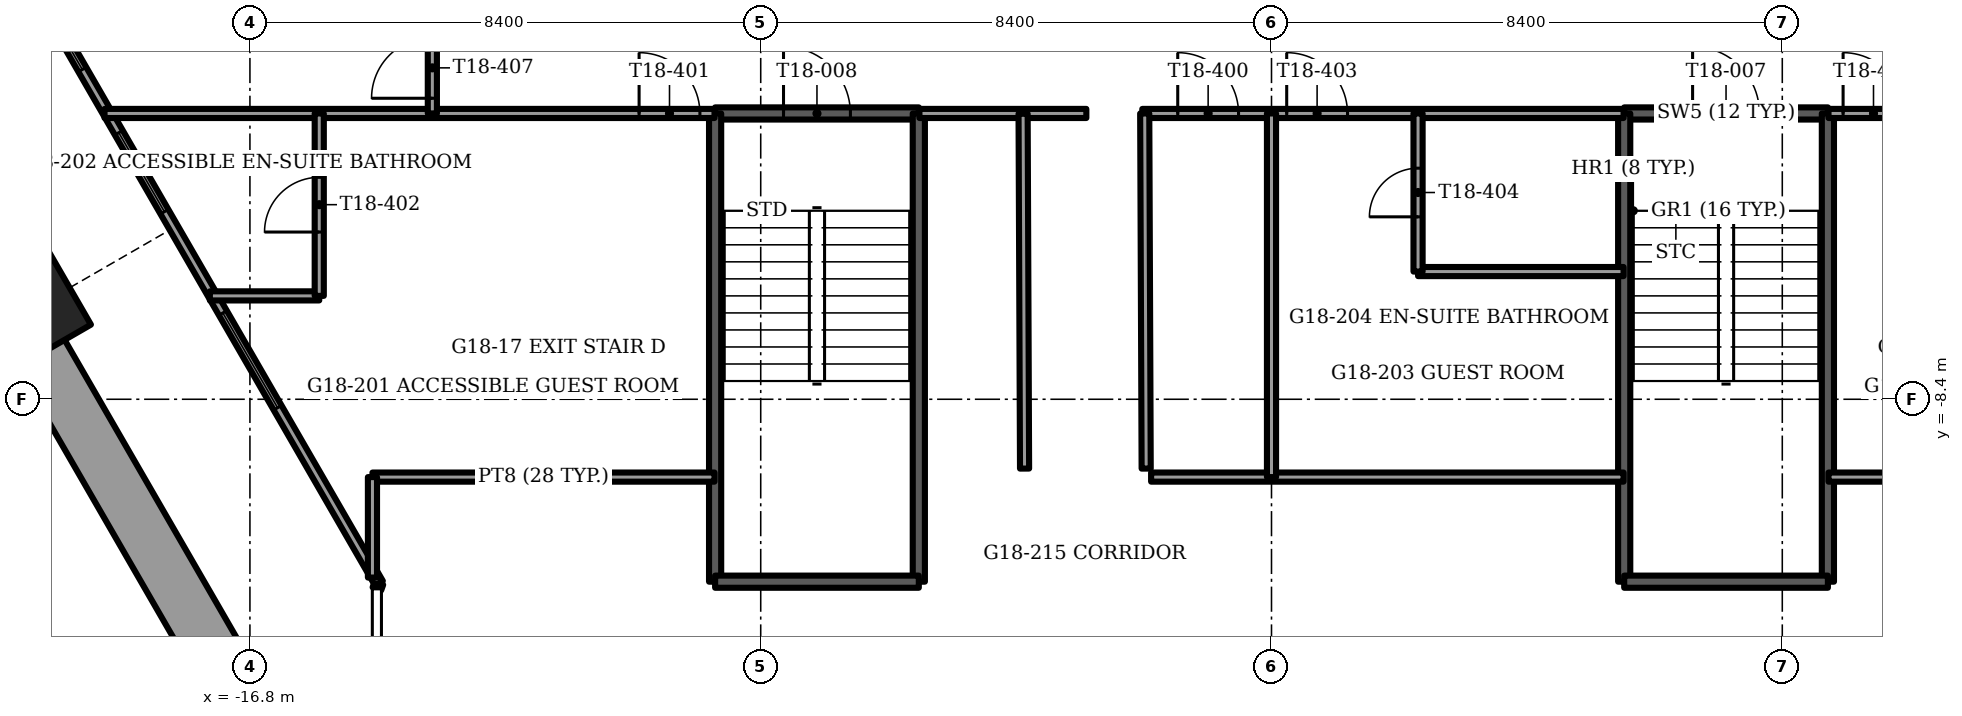
"""IFC4 building model, lengths in metres.
Left out: names, types, materials, properties, quantities, classifications, styles, units other than length and angle.
Written with IfcOpenShell. Run it as: python <this file> out.ifc"""

import sys

from ifc_helpers import new_model, si_unit, direction, frame, frame_2d, origin, origin_2d, place, context, subcontext, project, spatial, rectangle, extrude, element, fill, save


model = new_model("IFC4")
c1 = context("Model", 3, precision=1e-05, world=origin(), true_north=direction((0.0, 1.0)))
c2 = subcontext(c1, "Body", "Model", "MODEL_VIEW")
j1 = project(units=[si_unit("LENGTHUNIT", "METRE"), si_unit("PLANEANGLEUNIT", "RADIAN")], contexts=[c1])
p1 = place(None, origin())
s1 = spatial("IfcSite", under=j1, at=p1, CompositionType="ELEMENT")
p2 = place(p1, origin())
s2 = spatial("IfcBuilding", under=s1, at=p2, CompositionType="ELEMENT")
p3 = place(p2, frame((0.0, 0.0, 73.0)))
s3 = spatial("IfcBuildingStorey", under=s2, at=p3, CompositionType="ELEMENT", Elevation=73.0)
p4 = place(p3, frame((-20.371, -6.917, -1.2), z_axis=(0.0, 0.0, 1.0), x_axis=(-0.5, 0.866025403784, 0.0)))
e1 = element("IfcColumn", 1, at=p4, inside=s3, PredefinedType="COLUMN", context=c2, shape_type="SweptSolid", body=[
    extrude(rectangle(XDim=1.4, YDim=1.4, at=origin_2d()), origin(), (0.0, 0.0, 1.0), 3.75),
])
p5 = place(p3, frame((-20.252, -7.622, 0.0), z_axis=(0.0, 0.0, 1.0), x_axis=(0.499997206141, -0.866027016814, 0.0)))
e2 = element("IfcWall", 2, at=p5, inside=s3, PredefinedType="PARAPET", context=c2, shape_type="SweptSolid", body=[
    extrude(rectangle(XDim=7.051, YDim=0.9, at=frame_2d((3.525, 0.0))), origin(), (0.0, 0.0, 1.0), 1.1),
])
p6 = place(p3, frame((-20.401, -1.514, 0.0), z_axis=(0.0, 0.0, 1.0), x_axis=(0.499991453095, -0.866030338286, 0.0)))
e3 = element("IfcWall", 3, at=p6, inside=s3, PredefinedType="SOLIDWALL", context=c2, shape_type="SweptSolid", body=[
    extrude(rectangle(XDim=11.444, YDim=0.15, at=frame_2d((5.722, 0.0))), origin(), (0.0, 0.0, 1.0), 3.45),
])
p7 = place(p6, frame((0.789, 0.0, 0.15)))
e4 = element("IfcOpeningElement", 4, at=p7, cuts=e3, PredefinedType="OPENING", context=c2, shape_type="SweptSolid", body=[
    extrude(rectangle(XDim=0.9, YDim=2.2, at=frame_2d((0.45, 1.1))), frame((0.0, 0.075, 0.0), z_axis=(0.0, -1.0, 0.0), x_axis=(1.0, 0.0, 0.0)), (0.0, 0.0, 1.0), 0.15),
])
p8 = place(p6, frame((2.889, 0.0, 0.15)))
e5 = element("IfcOpeningElement", 5, at=p8, cuts=e3, PredefinedType="OPENING", context=c2, shape_type="SweptSolid", body=[
    extrude(rectangle(XDim=1.5, YDim=2.2, at=frame_2d((0.75, 1.1))), frame((0.0, 0.075, 0.0), z_axis=(0.0, -1.0, 0.0), x_axis=(1.0, 0.0, 0.0)), (0.0, 0.0, 1.0), 0.15),
])
p9 = place(p6, frame((6.312, 0.0, 0.15)))
e6 = element("IfcOpeningElement", 6, at=p9, cuts=e3, PredefinedType="OPENING", context=c2, shape_type="SweptSolid", body=[
    extrude(rectangle(XDim=1.8, YDim=2.2, at=frame_2d((0.9, 1.1))), frame((0.0, 0.075, 0.0), z_axis=(0.0, -1.0, 0.0), x_axis=(1.0, 0.0, 0.0)), (0.0, 0.0, 1.0), 0.15),
])
p10 = place(p3, frame((-14.679, -11.425, 0.0), z_axis=(0.0, 0.0, 1.0), x_axis=(-0.338543167143, -0.940950861619, 0.0)))
e7 = element("IfcWall", 7, at=p10, inside=s3, PredefinedType="SOLIDWALL", context=c2, shape_type="SweptSolid", body=[
    extrude(rectangle(XDim=0.098, YDim=0.15, at=frame_2d((0.049, 0.0))), origin(), (0.0, 0.0, 1.0), 3.45),
])
p11 = place(p3, frame((5.8, -3.7, -0.3), z_axis=(0.0, 0.0, 1.0), x_axis=(1.0, 0.0, 0.0)))
e8 = element("IfcWall", 8, at=p11, inside=s3, PredefinedType="SOLIDWALL", context=c2, shape_type="SweptSolid", body=[
    extrude(rectangle(XDim=3.35, YDim=0.2, at=frame_2d((1.675, 0.0))), origin(), (0.0, 0.0, 1.0), 3.75),
])
p12 = place(p11, frame((1.125, 0.0, 0.0)))
e9 = element("IfcOpeningElement", 9, at=p12, cuts=e8, PredefinedType="OPENING", context=c2, shape_type="SweptSolid", body=[
    extrude(rectangle(XDim=1.1, YDim=2.1, at=frame_2d((0.55, 1.05))), frame((0.0, 0.1, 0.0), z_axis=(0.0, -1.0, 0.0), x_axis=(1.0, 0.0, 0.0)), (0.0, 0.0, 1.0), 0.2),
])
for number, where, z_axis, x_axis in (
    (10, (5.8, -3.7, -0.3), (0.0, 0.0, 1.0), (0.0, -1.0, 0.0)),
    (11, (9.15, -3.7, -0.3), (0.0, 0.0, 1.0), (0.0, -1.0, 0.0)),
):
    element("IfcWall", number, at=place(p3, frame(where, z_axis=z_axis, x_axis=x_axis)), inside=s3, PredefinedType="SOLIDWALL", context=c2, shape_type="SweptSolid", body=[
        extrude(rectangle(XDim=7.7, YDim=0.2, at=frame_2d((3.85, 0.0))), origin(), (0.0, 0.0, 1.0), 3.75),
    ])
p13 = place(p3, frame((5.8, -11.4, -0.3), z_axis=(0.0, 0.0, 1.0), x_axis=(1.0, 0.0, 0.0)))
e12 = element("IfcWall", 12, at=p13, inside=s3, PredefinedType="SOLIDWALL", context=c2, shape_type="SweptSolid", body=[
    extrude(rectangle(XDim=3.35, YDim=0.2, at=frame_2d((1.675, 0.0))), origin(), (0.0, 0.0, 1.0), 3.75),
])
p14 = place(p3, frame((-9.15, -3.7, -0.3), z_axis=(0.0, 0.0, 1.0), x_axis=(1.0, 0.0, 0.0)))
e13 = element("IfcWall", 13, at=p14, inside=s3, PredefinedType="SOLIDWALL", context=c2, shape_type="SweptSolid", body=[
    extrude(rectangle(XDim=3.35, YDim=0.2, at=frame_2d((1.675, 0.0))), origin(), (0.0, 0.0, 1.0), 3.75),
])
p15 = place(p14, frame((1.125, 0.0, 0.0)))
e14 = element("IfcOpeningElement", 14, at=p15, cuts=e13, PredefinedType="OPENING", context=c2, shape_type="SweptSolid", body=[
    extrude(rectangle(XDim=1.1, YDim=2.1, at=frame_2d((0.55, 1.05))), frame((0.0, 0.1, 0.0), z_axis=(0.0, -1.0, 0.0), x_axis=(1.0, 0.0, 0.0)), (0.0, 0.0, 1.0), 0.2),
])
for number, where, z_axis, x_axis in (
    (15, (-9.15, -3.7, -0.3), (0.0, 0.0, 1.0), (0.0, -1.0, 0.0)),
    (16, (-5.8, -3.7, -0.3), (0.0, 0.0, 1.0), (0.0, -1.0, 0.0)),
):
    element("IfcWall", number, at=place(p3, frame(where, z_axis=z_axis, x_axis=x_axis)), inside=s3, PredefinedType="SOLIDWALL", context=c2, shape_type="SweptSolid", body=[
        extrude(rectangle(XDim=7.7, YDim=0.2, at=frame_2d((3.85, 0.0))), origin(), (0.0, 0.0, 1.0), 3.75),
    ])
p16 = place(p3, frame((-9.15, -11.4, -0.3), z_axis=(0.0, 0.0, 1.0), x_axis=(1.0, 0.0, 0.0)))
e17 = element("IfcWall", 17, at=p16, inside=s3, PredefinedType="SOLIDWALL", context=c2, shape_type="SweptSolid", body=[
    extrude(rectangle(XDim=3.35, YDim=0.2, at=frame_2d((1.675, 0.0))), origin(), (0.0, 0.0, 1.0), 3.75),
])
p17 = place(p3, frame((-14.785, -9.68, 0.0), z_axis=(0.0, 0.0, 1.0), x_axis=(1.0, 0.0, 0.0)))
e18 = element("IfcWall", 18, at=p17, inside=s3, PredefinedType="PARTITIONING", context=c2, shape_type="SweptSolid", body=[
    extrude(rectangle(XDim=5.625, YDim=0.15, at=frame_2d((2.812, 0.0))), origin(), (0.0, 0.0, 1.0), 3.45),
])
p18 = place(p3, frame((-1.98, -9.68, 0.0), z_axis=(0.0, 0.0, 1.0), x_axis=(1.0, 0.0, 0.0)))
e19 = element("IfcWall", 19, at=p18, inside=s3, PredefinedType="PARTITIONING", context=c2, shape_type="SweptSolid", body=[
    extrude(rectangle(XDim=7.77, YDim=0.15, at=frame_2d((3.885, 0.0))), origin(), (0.0, 0.0, 1.0), 3.45),
])
p19 = place(p3, frame((9.16, -9.68, 0.0), z_axis=(0.0, 0.0, 1.0), x_axis=(1.0, 0.0, 0.0)))
e20 = element("IfcWall", 20, at=p19, inside=s3, PredefinedType="PARTITIONING", context=c2, shape_type="SweptSolid", body=[
    extrude(rectangle(XDim=5.625, YDim=0.15, at=frame_2d((2.812, 0.0))), origin(), (0.0, 0.0, 1.0), 3.45),
])
p20 = place(p3, frame((-17.459, -6.7, 0.0), z_axis=(0.0, 0.0, 1.0), x_axis=(1.0, 0.0, 0.0)))
e21 = element("IfcWall", 21, at=p20, inside=s3, PredefinedType="PARTITIONING", context=c2, shape_type="SweptSolid", body=[
    extrude(rectangle(XDim=1.799, YDim=0.15, at=frame_2d((0.899, 0.0))), origin(), (0.0, 0.0, 1.0), 3.45),
])
p21 = place(p3, frame((2.41, -6.3, 0.0), z_axis=(0.0, 0.0, 1.0), x_axis=(1.0, 0.0, 0.0)))
e22 = element("IfcWall", 22, at=p21, inside=s3, PredefinedType="PARTITIONING", context=c2, shape_type="SweptSolid", body=[
    extrude(rectangle(XDim=3.38, YDim=0.15, at=frame_2d((1.69, 0.0))), origin(), (0.0, 0.0, 1.0), 3.45),
])
p22 = place(p3, frame((-19.191, -3.7, 0.0), z_axis=(0.0, 0.0, 1.0), x_axis=(1.0, 0.0, 0.0)))
e23 = element("IfcWall", 23, at=p22, inside=s3, PredefinedType="PARTITIONING", context=c2, shape_type="SweptSolid", body=[
    extrude(rectangle(XDim=10.031, YDim=0.15, at=frame_2d((5.016, 0.0))), origin(), (0.0, 0.0, 1.0), 3.45),
])
p23 = place(p22, frame((8.791, 0.0, 0.0)))
e24 = element("IfcOpeningElement", 24, at=p23, cuts=e23, PredefinedType="OPENING", context=c2, shape_type="SweptSolid", body=[
    extrude(rectangle(XDim=1.0, YDim=2.1, at=frame_2d((0.5, 1.05))), frame((0.0, 0.075, 0.0), z_axis=(0.0, -1.0, 0.0), x_axis=(1.0, 0.0, 0.0)), (0.0, 0.0, 1.0), 0.15),
])
p24 = place(p3, frame((-5.79, -3.7, 0.0), z_axis=(0.0, 0.0, 1.0), x_axis=(1.0, 0.0, 0.0)))
e25 = element("IfcWall", 25, at=p24, inside=s3, PredefinedType="PARTITIONING", context=c2, shape_type="SweptSolid", body=[
    extrude(rectangle(XDim=2.745, YDim=0.15, at=frame_2d((1.373, 0.0))), origin(), (0.0, 0.0, 1.0), 3.45),
])
p25 = place(p3, frame((-2.125, -3.7, 0.0), z_axis=(0.0, 0.0, 1.0), x_axis=(1.0, 0.0, 0.0)))
e26 = element("IfcWall", 26, at=p25, inside=s3, PredefinedType="PARTITIONING", context=c2, shape_type="SweptSolid", body=[
    extrude(rectangle(XDim=7.915, YDim=0.15, at=frame_2d((3.958, 0.0))), origin(), (0.0, 0.0, 1.0), 3.45),
])
p26 = place(p25, frame((0.583, 0.0, 0.0)))
e27 = element("IfcOpeningElement", 27, at=p26, cuts=e26, PredefinedType="OPENING", context=c2, shape_type="SweptSolid", body=[
    extrude(rectangle(XDim=1.0, YDim=2.1, at=frame_2d((0.5, 1.05))), frame((0.0, 0.075, 0.0), z_axis=(0.0, -1.0, 0.0), x_axis=(1.0, 0.0, 0.0)), (0.0, 0.0, 1.0), 0.15),
])
p27 = place(p25, frame((2.375, 0.0, 0.0)))
e28 = element("IfcOpeningElement", 28, at=p27, cuts=e26, PredefinedType="OPENING", context=c2, shape_type="SweptSolid", body=[
    extrude(rectangle(XDim=1.0, YDim=2.1, at=frame_2d((0.5, 1.05))), frame((0.0, 0.075, 0.0), z_axis=(0.0, -1.0, 0.0), x_axis=(1.0, 0.0, 0.0)), (0.0, 0.0, 1.0), 0.15),
])
p28 = place(p3, frame((9.16, -3.7, 0.0), z_axis=(0.0, 0.0, 1.0), x_axis=(1.0, 0.0, 0.0)))
e29 = element("IfcWall", 29, at=p28, inside=s3, PredefinedType="PARTITIONING", context=c2, shape_type="SweptSolid", body=[
    extrude(rectangle(XDim=10.031, YDim=0.15, at=frame_2d((5.016, 0.0))), origin(), (0.0, 0.0, 1.0), 3.45),
])
p29 = place(p28, frame((0.24, 0.0, 0.0)))
e30 = element("IfcOpeningElement", 30, at=p29, cuts=e29, PredefinedType="OPENING", context=c2, shape_type="SweptSolid", body=[
    extrude(rectangle(XDim=1.0, YDim=2.1, at=frame_2d((0.5, 1.05))), frame((0.0, 0.075, 0.0), z_axis=(0.0, -1.0, 0.0), x_axis=(1.0, 0.0, 0.0)), (0.0, 0.0, 1.0), 0.15),
])
p30 = place(p3, frame((2.41, -6.3, 0.0), z_axis=(0.0, 0.0, 1.0), x_axis=(0.0, 1.0, 0.0)))
e31 = element("IfcWall", 31, at=p30, inside=s3, PredefinedType="PARTITIONING", context=c2, shape_type="SweptSolid", body=[
    extrude(rectangle(XDim=2.6, YDim=0.15, at=frame_2d((1.3, 0.0))), origin(), (0.0, 0.0, 1.0), 3.45),
])
p31 = place(p30, frame((0.9, 0.0, 0.0)))
e32 = element("IfcOpeningElement", 32, at=p31, cuts=e31, PredefinedType="OPENING", context=c2, shape_type="SweptSolid", body=[
    extrude(rectangle(XDim=0.8, YDim=2.1, at=frame_2d((0.4, 1.05))), frame((0.0, 0.075, 0.0), z_axis=(0.0, -1.0, 0.0), x_axis=(1.0, 0.0, 0.0)), (0.0, 0.0, 1.0), 0.15),
])
p32 = place(p3, frame((0.0, -9.68, 0.0), z_axis=(0.0, 0.0, 1.0), x_axis=(0.0, 1.0, 0.0)))
e33 = element("IfcWall", 33, at=p32, inside=s3, PredefinedType="PARTITIONING", context=c2, shape_type="SweptSolid", body=[
    extrude(rectangle(XDim=5.98, YDim=0.15, at=frame_2d((2.99, 0.0))), origin(), (0.0, 0.0, 1.0), 3.45),
])
p33 = place(p3, frame((-13.8, -3.7, 0.0), z_axis=(0.0, 0.0, 1.0), x_axis=(0.0, 1.0, 0.0)))
e34 = element("IfcWall", 34, at=p33, inside=s3, PredefinedType="PARTITIONING", context=c2, shape_type="SweptSolid", body=[
    extrude(rectangle(XDim=11.415, YDim=0.15, at=frame_2d((5.708, 0.0))), origin(), (0.0, 0.0, 1.0), 3.45),
])
p34 = place(p33, frame((0.25, 0.0, 0.0)))
e35 = element("IfcOpeningElement", 35, at=p34, cuts=e34, PredefinedType="OPENING", context=c2, shape_type="SweptSolid", body=[
    extrude(rectangle(XDim=1.0, YDim=2.1, at=frame_2d((0.5, 1.05))), frame((0.0, 0.075, 0.0), z_axis=(0.0, -1.0, 0.0), x_axis=(1.0, 0.0, 0.0)), (0.0, 0.0, 1.0), 0.15),
])
p35 = place(p33, frame((7.308, 0.0, 0.0)))
e36 = element("IfcOpeningElement", 36, at=p35, cuts=e34, PredefinedType="OPENING", context=c2, shape_type="SweptSolid", body=[
    extrude(rectangle(XDim=1.0, YDim=2.1, at=frame_2d((0.5, 1.05))), frame((0.0, 0.075, 0.0), z_axis=(0.0, -1.0, 0.0), x_axis=(1.0, 0.0, 0.0)), (0.0, 0.0, 1.0), 0.15),
])
p36 = place(p3, frame((-14.785, -11.332, 0.0), z_axis=(0.0, 0.0, 1.0), x_axis=(0.0, 1.0, 0.0)))
e37 = element("IfcWall", 37, at=p36, inside=s3, PredefinedType="PARTITIONING", context=c2, shape_type="SweptSolid", body=[
    extrude(rectangle(XDim=1.652, YDim=0.15, at=frame_2d((0.826, 0.0))), origin(), (0.0, 0.0, 1.0), 3.45),
])
p37 = place(p3, frame((-15.66, -6.7, 0.0), z_axis=(0.0, 0.0, 1.0), x_axis=(0.0, 1.0, 0.0)))
e38 = element("IfcWall", 38, at=p37, inside=s3, PredefinedType="PARTITIONING", context=c2, shape_type="SweptSolid", body=[
    extrude(rectangle(XDim=3.0, YDim=0.15, at=frame_2d((1.5, 0.0))), origin(), (0.0, 0.0, 1.0), 3.45),
])
p38 = place(p37, frame((1.05, 0.0, 0.0)))
e39 = element("IfcOpeningElement", 39, at=p38, cuts=e38, PredefinedType="OPENING", context=c2, shape_type="SweptSolid", body=[
    extrude(rectangle(XDim=0.9, YDim=2.1, at=frame_2d((0.45, 1.05))), frame((0.0, 0.075, 0.0), z_axis=(0.0, -1.0, 0.0), x_axis=(1.0, 0.0, 0.0)), (0.0, 0.0, 1.0), 0.15),
])
p39 = place(p3, frame((-2.061, -9.54, 0.0), z_axis=(0.0, 0.0, 1.0), x_axis=(-0.004096784315, 0.999991608144, 0.0)))
e40 = element("IfcWall", 40, at=p39, inside=s3, PredefinedType="PARTITIONING", context=c2, shape_type="SweptSolid", body=[
    extrude(rectangle(XDim=5.84, YDim=0.15, at=frame_2d((2.92, 0.0))), origin(), (0.0, 0.0, 1.0), 3.45),
])
p40 = place(p3, frame((-4.061, -9.54, 0.0), z_axis=(0.0, 0.0, 1.0), x_axis=(-0.004100383939, 0.99999159339, 0.0)))
e41 = element("IfcWall", 41, at=p40, inside=s3, PredefinedType="PARTITIONING", context=c2, shape_type="SweptSolid", body=[
    extrude(rectangle(XDim=5.835, YDim=0.15, at=frame_2d((2.917, 0.0))), origin(), (0.0, 0.0, 1.0), 3.45),
])
p41 = place(p7, origin())
e42 = element("IfcWindow", 42, at=p41, inside=s3, PartitioningType="SINGLE_PANEL", PredefinedType="WINDOW", context=c2, shape_type="SweptSolid", body=[
    extrude(rectangle(XDim=0.9, YDim=2.2, at=frame_2d((0.45, 1.1))), frame((0.0, 0.03, 0.0), z_axis=(0.0, -1.0, 0.0), x_axis=(1.0, 0.0, 0.0)), (0.0, 0.0, 1.0), 0.06),
])
fill(e4, e42)
p42 = place(p8, origin())
e43 = element("IfcWindow", 43, at=p42, inside=s3, PartitioningType="SINGLE_PANEL", PredefinedType="WINDOW", context=c2, shape_type="SweptSolid", body=[
    extrude(rectangle(XDim=1.5, YDim=2.2, at=frame_2d((0.75, 1.1))), frame((0.0, 0.03, 0.0), z_axis=(0.0, -1.0, 0.0), x_axis=(1.0, 0.0, 0.0)), (0.0, 0.0, 1.0), 0.06),
])
fill(e5, e43)
p43 = place(p9, origin())
e44 = element("IfcWindow", 44, at=p43, inside=s3, PartitioningType="SINGLE_PANEL", PredefinedType="WINDOW", context=c2, shape_type="SweptSolid", body=[
    extrude(rectangle(XDim=1.8, YDim=2.2, at=frame_2d((0.9, 1.1))), frame((0.0, 0.03, 0.0), z_axis=(0.0, -1.0, 0.0), x_axis=(1.0, 0.0, 0.0)), (0.0, 0.0, 1.0), 0.06),
])
fill(e6, e44)
p44 = place(p12, origin())
e45 = element("IfcDoor", 45, at=p44, inside=s3, OperationType="SINGLE_SWING_LEFT", PredefinedType="DOOR", context=c2, shape_type="SweptSolid", body=[
    extrude(rectangle(XDim=1.1, YDim=2.1, at=frame_2d((0.55, 1.05))), frame((0.0, 0.025, 0.0), z_axis=(0.0, -1.0, 0.0), x_axis=(1.0, 0.0, 0.0)), (0.0, 0.0, 1.0), 0.05),
])
fill(e9, e45)
p45 = place(p15, origin())
e46 = element("IfcDoor", 46, at=p45, inside=s3, OperationType="SINGLE_SWING_LEFT", PredefinedType="DOOR", context=c2, shape_type="SweptSolid", body=[
    extrude(rectangle(XDim=1.1, YDim=2.1, at=frame_2d((0.55, 1.05))), frame((0.0, 0.025, 0.0), z_axis=(0.0, -1.0, 0.0), x_axis=(1.0, 0.0, 0.0)), (0.0, 0.0, 1.0), 0.05),
])
fill(e14, e46)
p46 = place(p26, origin())
e47 = element("IfcDoor", 47, at=p46, inside=s3, OperationType="SINGLE_SWING_RIGHT", PredefinedType="DOOR", context=c2, shape_type="SweptSolid", body=[
    extrude(rectangle(XDim=1.0, YDim=2.1, at=frame_2d((0.5, 1.05))), frame((0.0, 0.025, 0.0), z_axis=(0.0, -1.0, 0.0), x_axis=(1.0, 0.0, 0.0)), (0.0, 0.0, 1.0), 0.05),
])
fill(e27, e47)
p47 = place(p23, origin())
e48 = element("IfcDoor", 48, at=p47, inside=s3, OperationType="SINGLE_SWING_RIGHT", PredefinedType="DOOR", context=c2, shape_type="SweptSolid", body=[
    extrude(rectangle(XDim=1.0, YDim=2.1, at=frame_2d((0.5, 1.05))), frame((0.0, 0.025, 0.0), z_axis=(0.0, -1.0, 0.0), x_axis=(1.0, 0.0, 0.0)), (0.0, 0.0, 1.0), 0.05),
])
fill(e24, e48)
p48 = place(p38, origin())
e49 = element("IfcDoor", 49, at=p48, inside=s3, OperationType="SINGLE_SWING_RIGHT", PredefinedType="DOOR", context=c2, shape_type="SweptSolid", body=[
    extrude(rectangle(XDim=0.9, YDim=2.1, at=frame_2d((0.45, 1.05))), frame((0.0, 0.025, 0.0), z_axis=(0.0, -1.0, 0.0), x_axis=(1.0, 0.0, 0.0)), (0.0, 0.0, 1.0), 0.05),
])
fill(e39, e49)
p49 = place(p27, origin())
e50 = element("IfcDoor", 50, at=p49, inside=s3, OperationType="SINGLE_SWING_LEFT", PredefinedType="DOOR", context=c2, shape_type="SweptSolid", body=[
    extrude(rectangle(XDim=1.0, YDim=2.1, at=frame_2d((0.5, 1.05))), frame((0.0, 0.025, 0.0), z_axis=(0.0, -1.0, 0.0), x_axis=(1.0, 0.0, 0.0)), (0.0, 0.0, 1.0), 0.05),
])
fill(e28, e50)
p50 = place(p31, origin())
e51 = element("IfcDoor", 51, at=p50, inside=s3, OperationType="SINGLE_SWING_RIGHT", PredefinedType="DOOR", context=c2, shape_type="SweptSolid", body=[
    extrude(rectangle(XDim=0.8, YDim=2.1, at=frame_2d((0.4, 1.05))), frame((0.0, 0.025, 0.0), z_axis=(0.0, -1.0, 0.0), x_axis=(1.0, 0.0, 0.0)), (0.0, 0.0, 1.0), 0.05),
])
fill(e32, e51)
p51 = place(p29, origin())
e52 = element("IfcDoor", 52, at=p51, inside=s3, OperationType="SINGLE_SWING_LEFT", PredefinedType="DOOR", context=c2, shape_type="SweptSolid", body=[
    extrude(rectangle(XDim=1.0, YDim=2.1, at=frame_2d((0.5, 1.05))), frame((0.0, 0.025, 0.0), z_axis=(0.0, -1.0, 0.0), x_axis=(1.0, 0.0, 0.0)), (0.0, 0.0, 1.0), 0.05),
])
fill(e30, e52)
p52 = place(p34, origin())
e53 = element("IfcDoor", 53, at=p52, inside=s3, OperationType="SINGLE_SWING_LEFT", PredefinedType="DOOR", context=c2, shape_type="SweptSolid", body=[
    extrude(rectangle(XDim=1.0, YDim=2.1, at=frame_2d((0.5, 1.05))), frame((0.0, 0.025, 0.0), z_axis=(0.0, -1.0, 0.0), x_axis=(1.0, 0.0, 0.0)), (0.0, 0.0, 1.0), 0.05),
])
fill(e35, e53)
save(model, sys.argv[1])
